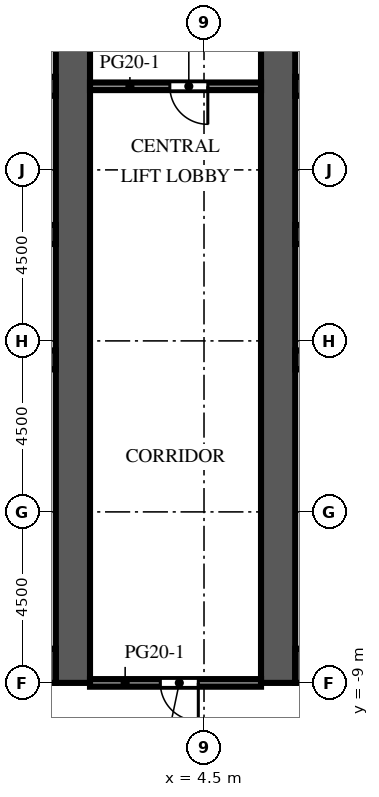
"""IFC4 building model, lengths in metres.
Left out: names, types, materials, properties, quantities, classifications, styles, units other than length and angle.
Written with IfcOpenShell. Run it as: python <this file> out.ifc"""

import sys

from ifc_helpers import new_model, si_unit, direction, frame, frame_2d, origin, place, context, subcontext, project, spatial, rectangle, extrude, element, fill, save


model = new_model("IFC4")
c1 = context("Model", 3, precision=1e-05, world=origin(), true_north=direction((0.0, 1.0)))
c2 = subcontext(c1, "Body", "Model", "MODEL_VIEW")
j1 = project(units=[si_unit("LENGTHUNIT", "METRE"), si_unit("PLANEANGLEUNIT", "RADIAN")], contexts=[c1])
p1 = place(None, origin())
s1 = spatial("IfcSite", under=j1, at=p1, CompositionType="ELEMENT")
p2 = place(p1, origin())
s2 = spatial("IfcBuilding", under=s1, at=p2, CompositionType="ELEMENT")
p3 = place(p2, frame((0.0, 0.0, 120.8)))
s3 = spatial("IfcBuildingStorey", under=s2, at=p3, CompositionType="ELEMENT", Elevation=120.8)
p4 = place(p3, frame((1.05, -9.0, 0.0), z_axis=(0.0, 0.0, 1.0), x_axis=(0.0, 1.0, 0.0)))
e1 = element("IfcWall", 1, at=p4, inside=s3, PredefinedType="SHEAR", context=c2, shape_type="SweptSolid", body=[
    extrude(rectangle(XDim=27.5, YDim=0.9, at=frame_2d((13.75, 0.0))), origin(), (0.0, 0.0, 1.0), 4.1),
])
p5 = place(p4, frame((12.55, 0.0, 0.0)))
e2 = element("IfcOpeningElement", 2, at=p5, cuts=e1, PredefinedType="OPENING", context=c2, shape_type="SweptSolid", body=[
    extrude(rectangle(XDim=2.4, YDim=2.4, at=frame_2d((1.2, 1.2))), frame((0.0, 0.46, 0.0), z_axis=(0.0, -1.0, 0.0), x_axis=(1.0, 0.0, 0.0)), (0.0, 0.0, 1.0), 0.92),
])
p6 = place(p4, frame((3.975, 0.0, 0.0)))
e3 = element("IfcOpeningElement", 3, at=p6, cuts=e1, PredefinedType="OPENING", context=c2, shape_type="SweptSolid", body=[
    extrude(rectangle(XDim=1.2, YDim=2.1, at=frame_2d((0.6, 1.05))), frame((0.0, 0.46, 0.0), z_axis=(0.0, -1.0, 0.0), x_axis=(1.0, 0.0, 0.0)), (0.0, 0.0, 1.0), 0.92),
])
p7 = place(p4, frame((19.485, 0.0, 0.0)))
e4 = element("IfcOpeningElement", 4, at=p7, cuts=e1, PredefinedType="OPENING", context=c2, shape_type="SweptSolid", body=[
    extrude(rectangle(XDim=1.0, YDim=2.1, at=frame_2d((0.5, 1.05))), frame((0.0, 0.46, 0.0), z_axis=(0.0, -1.0, 0.0), x_axis=(1.0, 0.0, 0.0)), (0.0, 0.0, 1.0), 0.92),
])
p8 = place(p4, frame((21.139, 0.0, 0.0)))
e5 = element("IfcOpeningElement", 5, at=p8, cuts=e1, PredefinedType="OPENING", context=c2, shape_type="SweptSolid", body=[
    extrude(rectangle(XDim=1.0, YDim=2.1, at=frame_2d((0.5, 1.05))), frame((0.0, 0.46, 0.0), z_axis=(0.0, -1.0, 0.0), x_axis=(1.0, 0.0, 0.0)), (0.0, 0.0, 1.0), 0.92),
])
p9 = place(p4, frame((23.16, 0.0, 0.0)))
e6 = element("IfcOpeningElement", 6, at=p9, cuts=e1, PredefinedType="OPENING", context=c2, shape_type="SweptSolid", body=[
    extrude(rectangle(XDim=1.0, YDim=2.1, at=frame_2d((0.5, 1.05))), frame((0.0, 0.46, 0.0), z_axis=(0.0, -1.0, 0.0), x_axis=(1.0, 0.0, 0.0)), (0.0, 0.0, 1.0), 0.92),
])
p10 = place(p4, frame((25.181, 0.0, 0.0)))
e7 = element("IfcOpeningElement", 7, at=p10, cuts=e1, PredefinedType="OPENING", context=c2, shape_type="SweptSolid", body=[
    extrude(rectangle(XDim=1.0, YDim=2.1, at=frame_2d((0.5, 1.05))), frame((0.0, 0.46, 0.0), z_axis=(0.0, -1.0, 0.0), x_axis=(1.0, 0.0, 0.0)), (0.0, 0.0, 1.0), 0.92),
])
p11 = place(p3, frame((-9.6, -8.55, 0.0), z_axis=(0.0, 0.0, 1.0), x_axis=(1.0, 0.0, 0.0)))
e8 = element("IfcWall", 8, at=p11, inside=s3, PredefinedType="SHEAR", context=c2, shape_type="SweptSolid", body=[
    extrude(rectangle(XDim=10.2, YDim=0.9, at=frame_2d((5.1, 0.0))), origin(), (0.0, 0.0, 1.0), 4.1),
])
p12 = place(p3, frame((-9.6, -0.5, 0.0), z_axis=(0.0, 0.0, 1.0), x_axis=(1.0, 0.0, 0.0)))
e9 = element("IfcWall", 9, at=p12, inside=s3, PredefinedType="SHEAR", context=c2, shape_type="SweptSolid", body=[
    extrude(rectangle(XDim=10.2, YDim=0.5, at=frame_2d((5.1, 0.0))), origin(), (0.0, 0.0, 1.0), 4.1),
])
p13 = place(p3, frame((-9.6, 2.8, 0.0), z_axis=(0.0, 0.0, 1.0), x_axis=(1.0, 0.0, 0.0)))
e10 = element("IfcWall", 10, at=p13, inside=s3, PredefinedType="SHEAR", context=c2, shape_type="SweptSolid", body=[
    extrude(rectangle(XDim=10.2, YDim=0.5, at=frame_2d((5.1, 0.0))), origin(), (0.0, 0.0, 1.0), 4.1),
])
p14 = place(p13, frame((0.562, 0.0, 0.0)))
e11 = element("IfcOpeningElement", 11, at=p14, cuts=e10, PredefinedType="OPENING", context=c2, shape_type="SweptSolid", body=[
    extrude(rectangle(XDim=1.1, YDim=2.1, at=frame_2d((0.55, 1.05))), frame((0.0, 0.26, 0.0), z_axis=(0.0, -1.0, 0.0), x_axis=(1.0, 0.0, 0.0)), (0.0, 0.0, 1.0), 0.52),
])
p15 = place(p13, frame((3.238, 0.0, 0.0)))
e12 = element("IfcOpeningElement", 12, at=p15, cuts=e10, PredefinedType="OPENING", context=c2, shape_type="SweptSolid", body=[
    extrude(rectangle(XDim=1.1, YDim=2.1, at=frame_2d((0.55, 1.05))), frame((0.0, 0.26, 0.0), z_axis=(0.0, -1.0, 0.0), x_axis=(1.0, 0.0, 0.0)), (0.0, 0.0, 1.0), 0.52),
])
p16 = place(p13, frame((8.538, 0.0, 0.0)))
e13 = element("IfcOpeningElement", 13, at=p16, cuts=e10, PredefinedType="OPENING", context=c2, shape_type="SweptSolid", body=[
    extrude(rectangle(XDim=1.1, YDim=2.1, at=frame_2d((0.55, 1.05))), frame((0.0, 0.26, 0.0), z_axis=(0.0, -1.0, 0.0), x_axis=(1.0, 0.0, 0.0)), (0.0, 0.0, 1.0), 0.52),
])
p17 = place(p3, frame((-9.6, 6.7, 0.0), z_axis=(0.0, 0.0, 1.0), x_axis=(1.0, 0.0, 0.0)))
e14 = element("IfcWall", 14, at=p17, inside=s3, PredefinedType="SHEAR", context=c2, shape_type="SweptSolid", body=[
    extrude(rectangle(XDim=10.2, YDim=0.5, at=frame_2d((5.1, 0.0))), origin(), (0.0, 0.0, 1.0), 4.1),
])
p18 = place(p17, frame((0.562, 0.0, 0.0)))
e15 = element("IfcOpeningElement", 15, at=p18, cuts=e14, PredefinedType="OPENING", context=c2, shape_type="SweptSolid", body=[
    extrude(rectangle(XDim=1.1, YDim=2.1, at=frame_2d((0.55, 1.05))), frame((0.0, 0.26, 0.0), z_axis=(0.0, -1.0, 0.0), x_axis=(1.0, 0.0, 0.0)), (0.0, 0.0, 1.0), 0.52),
])
p19 = place(p17, frame((3.288, 0.0, 0.0)))
e16 = element("IfcOpeningElement", 16, at=p19, cuts=e14, PredefinedType="OPENING", context=c2, shape_type="SweptSolid", body=[
    extrude(rectangle(XDim=1.0, YDim=2.1, at=frame_2d((0.5, 1.05))), frame((0.0, 0.26, 0.0), z_axis=(0.0, -1.0, 0.0), x_axis=(1.0, 0.0, 0.0)), (0.0, 0.0, 1.0), 0.52),
])
p20 = place(p17, frame((5.913, 0.0, 0.0)))
e17 = element("IfcOpeningElement", 17, at=p20, cuts=e14, PredefinedType="OPENING", context=c2, shape_type="SweptSolid", body=[
    extrude(rectangle(XDim=1.0, YDim=2.1, at=frame_2d((0.5, 1.05))), frame((0.0, 0.26, 0.0), z_axis=(0.0, -1.0, 0.0), x_axis=(1.0, 0.0, 0.0)), (0.0, 0.0, 1.0), 0.52),
])
p21 = place(p17, frame((8.587, 0.0, 0.0)))
e18 = element("IfcOpeningElement", 18, at=p21, cuts=e14, PredefinedType="OPENING", context=c2, shape_type="SweptSolid", body=[
    extrude(rectangle(XDim=1.0, YDim=2.1, at=frame_2d((0.5, 1.05))), frame((0.0, 0.26, 0.0), z_axis=(0.0, -1.0, 0.0), x_axis=(1.0, 0.0, 0.0)), (0.0, 0.0, 1.0), 0.52),
])
p22 = place(p3, frame((6.45, -9.0, 0.0), z_axis=(0.0, 0.0, 1.0), x_axis=(0.0, 1.0, 0.0)))
e19 = element("IfcWall", 19, at=p22, inside=s3, PredefinedType="SHEAR", context=c2, shape_type="SweptSolid", body=[
    extrude(rectangle(XDim=27.5, YDim=0.9, at=frame_2d((13.75, 0.0))), origin(), (0.0, 0.0, 1.0), 4.1),
])
p23 = place(p22, frame((12.55, 0.0, 0.0)))
e20 = element("IfcOpeningElement", 20, at=p23, cuts=e19, PredefinedType="OPENING", context=c2, shape_type="SweptSolid", body=[
    extrude(rectangle(XDim=2.4, YDim=2.4, at=frame_2d((1.2, 1.2))), frame((0.0, 0.46, 0.0), z_axis=(0.0, -1.0, 0.0), x_axis=(1.0, 0.0, 0.0)), (0.0, 0.0, 1.0), 0.92),
])
p24 = place(p22, frame((3.975, 0.0, 0.0)))
e21 = element("IfcOpeningElement", 21, at=p24, cuts=e19, PredefinedType="OPENING", context=c2, shape_type="SweptSolid", body=[
    extrude(rectangle(XDim=1.2, YDim=2.1, at=frame_2d((0.6, 1.05))), frame((0.0, 0.46, 0.0), z_axis=(0.0, -1.0, 0.0), x_axis=(1.0, 0.0, 0.0)), (0.0, 0.0, 1.0), 0.92),
])
p25 = place(p22, frame((19.485, 0.0, 0.0)))
e22 = element("IfcOpeningElement", 22, at=p25, cuts=e19, PredefinedType="OPENING", context=c2, shape_type="SweptSolid", body=[
    extrude(rectangle(XDim=1.0, YDim=2.1, at=frame_2d((0.5, 1.05))), frame((0.0, 0.46, 0.0), z_axis=(0.0, -1.0, 0.0), x_axis=(1.0, 0.0, 0.0)), (0.0, 0.0, 1.0), 0.92),
])
p26 = place(p22, frame((21.139, 0.0, 0.0)))
e23 = element("IfcOpeningElement", 23, at=p26, cuts=e19, PredefinedType="OPENING", context=c2, shape_type="SweptSolid", body=[
    extrude(rectangle(XDim=1.0, YDim=2.1, at=frame_2d((0.5, 1.05))), frame((0.0, 0.46, 0.0), z_axis=(0.0, -1.0, 0.0), x_axis=(1.0, 0.0, 0.0)), (0.0, 0.0, 1.0), 0.92),
])
p27 = place(p22, frame((23.16, 0.0, 0.0)))
e24 = element("IfcOpeningElement", 24, at=p27, cuts=e19, PredefinedType="OPENING", context=c2, shape_type="SweptSolid", body=[
    extrude(rectangle(XDim=1.0, YDim=2.1, at=frame_2d((0.5, 1.05))), frame((0.0, 0.46, 0.0), z_axis=(0.0, -1.0, 0.0), x_axis=(1.0, 0.0, 0.0)), (0.0, 0.0, 1.0), 0.92),
])
p28 = place(p22, frame((25.181, 0.0, 0.0)))
e25 = element("IfcOpeningElement", 25, at=p28, cuts=e19, PredefinedType="OPENING", context=c2, shape_type="SweptSolid", body=[
    extrude(rectangle(XDim=1.0, YDim=2.1, at=frame_2d((0.5, 1.05))), frame((0.0, 0.46, 0.0), z_axis=(0.0, -1.0, 0.0), x_axis=(1.0, 0.0, 0.0)), (0.0, 0.0, 1.0), 0.92),
])
p29 = place(p3, frame((6.9, -8.55, 0.0), z_axis=(0.0, 0.0, 1.0), x_axis=(1.0, 0.0, 0.0)))
e26 = element("IfcWall", 26, at=p29, inside=s3, PredefinedType="SHEAR", context=c2, shape_type="SweptSolid", body=[
    extrude(rectangle(XDim=10.2, YDim=0.9, at=frame_2d((5.1, 0.0))), origin(), (0.0, 0.0, 1.0), 4.1),
])
p30 = place(p3, frame((6.9, -0.5, 0.0), z_axis=(0.0, 0.0, 1.0), x_axis=(1.0, 0.0, 0.0)))
e27 = element("IfcWall", 27, at=p30, inside=s3, PredefinedType="SHEAR", context=c2, shape_type="SweptSolid", body=[
    extrude(rectangle(XDim=10.2, YDim=0.5, at=frame_2d((5.1, 0.0))), origin(), (0.0, 0.0, 1.0), 4.1),
])
p31 = place(p3, frame((6.9, 2.8, 0.0), z_axis=(0.0, 0.0, 1.0), x_axis=(1.0, 0.0, 0.0)))
e28 = element("IfcWall", 28, at=p31, inside=s3, PredefinedType="SHEAR", context=c2, shape_type="SweptSolid", body=[
    extrude(rectangle(XDim=10.2, YDim=0.5, at=frame_2d((5.1, 0.0))), origin(), (0.0, 0.0, 1.0), 4.1),
])
p32 = place(p31, frame((0.562, 0.0, 0.0)))
e29 = element("IfcOpeningElement", 29, at=p32, cuts=e28, PredefinedType="OPENING", context=c2, shape_type="SweptSolid", body=[
    extrude(rectangle(XDim=1.1, YDim=2.1, at=frame_2d((0.55, 1.05))), frame((0.0, 0.26, 0.0), z_axis=(0.0, -1.0, 0.0), x_axis=(1.0, 0.0, 0.0)), (0.0, 0.0, 1.0), 0.52),
])
p33 = place(p31, frame((3.238, 0.0, 0.0)))
e30 = element("IfcOpeningElement", 30, at=p33, cuts=e28, PredefinedType="OPENING", context=c2, shape_type="SweptSolid", body=[
    extrude(rectangle(XDim=1.1, YDim=2.1, at=frame_2d((0.55, 1.05))), frame((0.0, 0.26, 0.0), z_axis=(0.0, -1.0, 0.0), x_axis=(1.0, 0.0, 0.0)), (0.0, 0.0, 1.0), 0.52),
])
p34 = place(p31, frame((8.538, 0.0, 0.0)))
e31 = element("IfcOpeningElement", 31, at=p34, cuts=e28, PredefinedType="OPENING", context=c2, shape_type="SweptSolid", body=[
    extrude(rectangle(XDim=1.1, YDim=2.1, at=frame_2d((0.55, 1.05))), frame((0.0, 0.26, 0.0), z_axis=(0.0, -1.0, 0.0), x_axis=(1.0, 0.0, 0.0)), (0.0, 0.0, 1.0), 0.52),
])
p35 = place(p3, frame((6.9, 6.7, 0.0), z_axis=(0.0, 0.0, 1.0), x_axis=(1.0, 0.0, 0.0)))
e32 = element("IfcWall", 32, at=p35, inside=s3, PredefinedType="SHEAR", context=c2, shape_type="SweptSolid", body=[
    extrude(rectangle(XDim=10.2, YDim=0.5, at=frame_2d((5.1, 0.0))), origin(), (0.0, 0.0, 1.0), 4.1),
])
p36 = place(p35, frame((0.562, 0.0, 0.0)))
e33 = element("IfcOpeningElement", 33, at=p36, cuts=e32, PredefinedType="OPENING", context=c2, shape_type="SweptSolid", body=[
    extrude(rectangle(XDim=1.1, YDim=2.1, at=frame_2d((0.55, 1.05))), frame((0.0, 0.26, 0.0), z_axis=(0.0, -1.0, 0.0), x_axis=(1.0, 0.0, 0.0)), (0.0, 0.0, 1.0), 0.52),
])
p37 = place(p35, frame((3.288, 0.0, 0.0)))
e34 = element("IfcOpeningElement", 34, at=p37, cuts=e32, PredefinedType="OPENING", context=c2, shape_type="SweptSolid", body=[
    extrude(rectangle(XDim=1.0, YDim=2.1, at=frame_2d((0.5, 1.05))), frame((0.0, 0.26, 0.0), z_axis=(0.0, -1.0, 0.0), x_axis=(1.0, 0.0, 0.0)), (0.0, 0.0, 1.0), 0.52),
])
p38 = place(p35, frame((5.913, 0.0, 0.0)))
e35 = element("IfcOpeningElement", 35, at=p38, cuts=e32, PredefinedType="OPENING", context=c2, shape_type="SweptSolid", body=[
    extrude(rectangle(XDim=1.0, YDim=2.1, at=frame_2d((0.5, 1.05))), frame((0.0, 0.26, 0.0), z_axis=(0.0, -1.0, 0.0), x_axis=(1.0, 0.0, 0.0)), (0.0, 0.0, 1.0), 0.52),
])
p39 = place(p35, frame((8.587, 0.0, 0.0)))
e36 = element("IfcOpeningElement", 36, at=p39, cuts=e32, PredefinedType="OPENING", context=c2, shape_type="SweptSolid", body=[
    extrude(rectangle(XDim=1.0, YDim=2.1, at=frame_2d((0.5, 1.05))), frame((0.0, 0.26, 0.0), z_axis=(0.0, -1.0, 0.0), x_axis=(1.0, 0.0, 0.0)), (0.0, 0.0, 1.0), 0.52),
])
p40 = place(p3, frame((-1.0, -5.895, 0.0), z_axis=(0.0, 0.0, 1.0), x_axis=(1.0, 0.0, 0.0)))
e37 = element("IfcWall", 37, at=p40, inside=s3, PredefinedType="PARTITIONING", context=c2, shape_type="SweptSolid", body=[
    extrude(rectangle(XDim=1.6, YDim=0.1, at=frame_2d((0.8, 0.0))), origin(), (0.0, 0.0, 1.0), 3.65),
])
p41 = place(p40, frame((0.3, 0.0, 0.0)))
e38 = element("IfcOpeningElement", 38, at=p41, cuts=e37, PredefinedType="OPENING", context=c2, shape_type="SweptSolid", body=[
    extrude(rectangle(XDim=1.0, YDim=2.1, at=frame_2d((0.5, 1.05))), frame((0.0, 0.06, 0.0), z_axis=(0.0, -1.0, 0.0), x_axis=(1.0, 0.0, 0.0)), (0.0, 0.0, 1.0), 0.12),
])
p42 = place(p3, frame((-1.0, -2.955, 0.0), z_axis=(0.0, 0.0, 1.0), x_axis=(1.0, 0.0, 0.0)))
e39 = element("IfcWall", 39, at=p42, inside=s3, PredefinedType="PARTITIONING", context=c2, shape_type="SweptSolid", body=[
    extrude(rectangle(XDim=1.6, YDim=0.1, at=frame_2d((0.8, 0.0))), origin(), (0.0, 0.0, 1.0), 3.65),
])
p43 = place(p42, frame((0.3, 0.0, 0.0)))
e40 = element("IfcOpeningElement", 40, at=p43, cuts=e39, PredefinedType="OPENING", context=c2, shape_type="SweptSolid", body=[
    extrude(rectangle(XDim=1.0, YDim=2.1, at=frame_2d((0.5, 1.05))), frame((0.0, 0.06, 0.0), z_axis=(0.0, -1.0, 0.0), x_axis=(1.0, 0.0, 0.0)), (0.0, 0.0, 1.0), 0.12),
])
p44 = place(p3, frame((6.9, -5.895, 0.0), z_axis=(0.0, 0.0, 1.0), x_axis=(1.0, 0.0, 0.0)))
e41 = element("IfcWall", 41, at=p44, inside=s3, PredefinedType="PARTITIONING", context=c2, shape_type="SweptSolid", body=[
    extrude(rectangle(XDim=1.6, YDim=0.1, at=frame_2d((0.8, 0.0))), origin(), (0.0, 0.0, 1.0), 3.65),
])
p45 = place(p44, frame((0.3, 0.0, 0.0)))
e42 = element("IfcOpeningElement", 42, at=p45, cuts=e41, PredefinedType="OPENING", context=c2, shape_type="SweptSolid", body=[
    extrude(rectangle(XDim=1.0, YDim=2.1, at=frame_2d((0.5, 1.05))), frame((0.0, 0.06, 0.0), z_axis=(0.0, -1.0, 0.0), x_axis=(1.0, 0.0, 0.0)), (0.0, 0.0, 1.0), 0.12),
])
p46 = place(p3, frame((6.9, -2.955, 0.0), z_axis=(0.0, 0.0, 1.0), x_axis=(1.0, 0.0, 0.0)))
e43 = element("IfcWall", 43, at=p46, inside=s3, PredefinedType="PARTITIONING", context=c2, shape_type="SweptSolid", body=[
    extrude(rectangle(XDim=1.6, YDim=0.1, at=frame_2d((0.8, 0.0))), origin(), (0.0, 0.0, 1.0), 3.65),
])
p47 = place(p46, frame((0.3, 0.0, 0.0)))
e44 = element("IfcOpeningElement", 44, at=p47, cuts=e43, PredefinedType="OPENING", context=c2, shape_type="SweptSolid", body=[
    extrude(rectangle(XDim=1.0, YDim=2.1, at=frame_2d((0.5, 1.05))), frame((0.0, 0.06, 0.0), z_axis=(0.0, -1.0, 0.0), x_axis=(1.0, 0.0, 0.0)), (0.0, 0.0, 1.0), 0.12),
])
p48 = place(p3, frame((6.0, -9.0, 0.0), z_axis=(0.0, 0.0, 1.0), x_axis=(-1.0, 0.0, 0.0)))
e45 = element("IfcWall", 45, at=p48, inside=s3, PredefinedType="PARTITIONING", context=c2, shape_type="SweptSolid", body=[
    extrude(rectangle(XDim=4.5, YDim=0.2, at=frame_2d((2.25, 0.0))), origin(), (0.0, 0.0, 1.0), 3.65),
])
p49 = place(p48, frame((1.65, 0.0, 0.0)))
e46 = element("IfcOpeningElement", 46, at=p49, cuts=e45, PredefinedType="OPENING", context=c2, shape_type="SweptSolid", body=[
    extrude(rectangle(XDim=1.0, YDim=2.1, at=frame_2d((0.5, 1.05))), frame((0.0, 0.11, 0.0), z_axis=(0.0, -1.0, 0.0), x_axis=(1.0, 0.0, 0.0)), (0.0, 0.0, 1.0), 0.22),
])
p50 = place(p3, frame((1.5, 6.7, 0.0), z_axis=(0.0, 0.0, 1.0), x_axis=(1.0, 0.0, 0.0)))
e47 = element("IfcWall", 47, at=p50, inside=s3, PredefinedType="PARTITIONING", context=c2, shape_type="SweptSolid", body=[
    extrude(rectangle(XDim=4.5, YDim=0.2, at=frame_2d((2.25, 0.0))), origin(), (0.0, 0.0, 1.0), 3.65),
])
p51 = place(p50, frame((2.1, 0.0, 0.0)))
e48 = element("IfcOpeningElement", 48, at=p51, cuts=e47, PredefinedType="OPENING", context=c2, shape_type="SweptSolid", body=[
    extrude(rectangle(XDim=1.0, YDim=2.1, at=frame_2d((0.5, 1.05))), frame((0.0, 0.11, 0.0), z_axis=(0.0, -1.0, 0.0), x_axis=(1.0, 0.0, 0.0)), (0.0, 0.0, 1.0), 0.22),
])
p52 = place(p5, origin())
e49 = element("IfcDoor", 49, at=p52, inside=s3, OperationType="DOUBLE_DOOR_DOUBLE_SWING", PredefinedType="DOOR", context=c2, shape_type="SweptSolid", body=[
    extrude(rectangle(XDim=2.4, YDim=2.4, at=frame_2d((1.2, 1.2))), frame((0.0, 0.025, 0.0), z_axis=(0.0, -1.0, 0.0), x_axis=(1.0, 0.0, 0.0)), (0.0, 0.0, 1.0), 0.05),
])
fill(e2, e49)
p53 = place(p23, origin())
e50 = element("IfcDoor", 50, at=p53, inside=s3, OperationType="DOUBLE_DOOR_DOUBLE_SWING", PredefinedType="DOOR", context=c2, shape_type="SweptSolid", body=[
    extrude(rectangle(XDim=2.4, YDim=2.4, at=frame_2d((1.2, 1.2))), frame((0.0, 0.025, 0.0), z_axis=(0.0, -1.0, 0.0), x_axis=(1.0, 0.0, 0.0)), (0.0, 0.0, 1.0), 0.05),
])
fill(e20, e50)
p54 = place(p6, origin())
e51 = element("IfcDoor", 51, at=p54, inside=s3, OperationType="SINGLE_SWING_LEFT", PredefinedType="DOOR", context=c2, shape_type="SweptSolid", body=[
    extrude(rectangle(XDim=1.2, YDim=2.1, at=frame_2d((0.6, 1.05))), frame((0.0, 0.425, 0.0), z_axis=(0.0, -1.0, 0.0), x_axis=(1.0, 0.0, 0.0)), (0.0, 0.0, 1.0), 0.05),
])
fill(e3, e51)
p55 = place(p24, origin())
e52 = element("IfcDoor", 52, at=p55, inside=s3, OperationType="SINGLE_SWING_RIGHT", PredefinedType="DOOR", context=c2, shape_type="SweptSolid", body=[
    extrude(rectangle(XDim=1.2, YDim=2.1, at=frame_2d((0.6, 1.05))), frame((0.0, -0.375, 0.0), z_axis=(0.0, -1.0, 0.0), x_axis=(1.0, 0.0, 0.0)), (0.0, 0.0, 1.0), 0.05),
])
fill(e21, e52)
p56 = place(p49, origin())
e53 = element("IfcDoor", 53, at=p56, inside=s3, OperationType="SINGLE_SWING_LEFT", PredefinedType="DOOR", context=c2, shape_type="SweptSolid", body=[
    extrude(rectangle(XDim=1.0, YDim=2.1, at=frame_2d((0.5, 1.05))), frame((0.0, 0.025, 0.0), z_axis=(0.0, -1.0, 0.0), x_axis=(1.0, 0.0, 0.0)), (0.0, 0.0, 1.0), 0.05),
])
fill(e46, e53)
p57 = place(p51, origin())
e54 = element("IfcDoor", 54, at=p57, inside=s3, OperationType="SINGLE_SWING_RIGHT", PredefinedType="DOOR", context=c2, shape_type="SweptSolid", body=[
    extrude(rectangle(XDim=1.0, YDim=2.1, at=frame_2d((0.5, 1.05))), frame((0.0, 0.025, 0.0), z_axis=(0.0, -1.0, 0.0), x_axis=(1.0, 0.0, 0.0)), (0.0, 0.0, 1.0), 0.05),
])
fill(e48, e54)
save(model, sys.argv[1])
